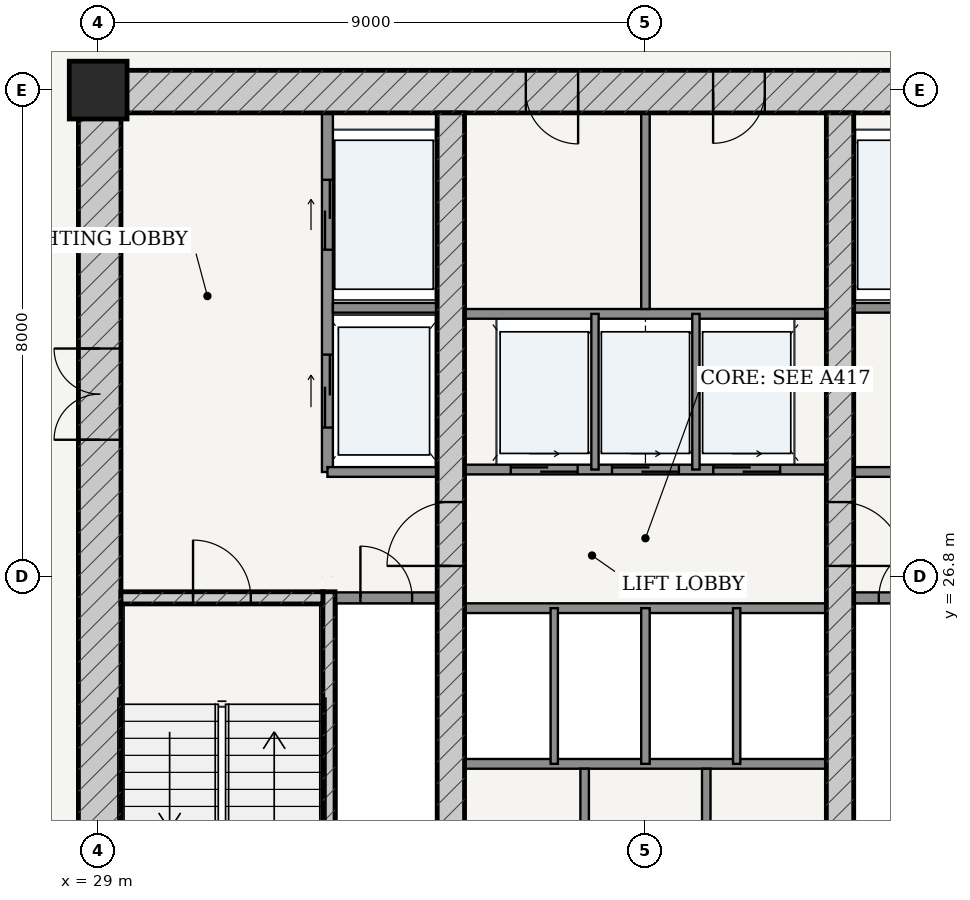
"""IFC4 building model, lengths in metres.
Left out: names, types, materials, properties, quantities, classifications, styles, units other than length and angle.
Written with IfcOpenShell. Run it as: python <this file> out.ifc"""

import sys

from ifc_helpers import new_model, si_unit, direction, frame, frame_2d, origin, origin_2d, place, context, subcontext, project, spatial, rectangle, extrude, source, transform, mapped, element, fill, save


model = new_model("IFC4")
c1 = context("Model", 3, precision=1e-05, world=origin(), true_north=direction((-0.2419218956, 0.970295726276)))
c2 = subcontext(c1, "Body", "Model", "MODEL_VIEW")
j1 = project(units=[si_unit("LENGTHUNIT", "METRE"), si_unit("PLANEANGLEUNIT", "RADIAN")], contexts=[c1])
p1 = place(None, origin())
s1 = spatial("IfcSite", under=j1, at=p1, CompositionType="ELEMENT")
p2 = place(p1, origin())
s2 = spatial("IfcBuilding", under=s1, at=p2, CompositionType="ELEMENT")
p3 = place(p2, frame((0.0, 0.0, 101.4)))
s3 = spatial("IfcBuildingStorey", under=s2, at=p3, CompositionType="ELEMENT", Elevation=101.4)
p4 = place(p3, frame((29.0, 34.8, 0.0), z_axis=(0.0, 0.0, 1.0), x_axis=(1.0, 0.0, 0.0)))
e1 = element("IfcColumn", 1, at=p4, inside=s3, PredefinedType="COLUMN", context=c2, shape_type="SweptSolid", body=[
    extrude(rectangle(XDim=0.95, YDim=0.95, at=origin_2d()), origin(), (0.0, 0.0, 1.0), 3.6),
])
p5 = place(p3, frame((28.675, 34.775, 0.0), z_axis=(0.0, 0.0, 1.0), x_axis=(1.0, 0.0, 0.0)))
e2 = element("IfcWall", 2, at=p5, inside=s3, PredefinedType="SHEAR", context=c2, shape_type="SweptSolid", body=[
    extrude(rectangle(XDim=18.65, YDim=0.7, at=frame_2d((9.325, 0.0))), origin(), (0.0, 0.0, 1.0), 3.325),
])
p6 = place(p5, frame((7.357, 0.0, 0.0)))
e3 = element("IfcOpeningElement", 3, at=p6, cuts=e2, PredefinedType="OPENING", context=c2, shape_type="SweptSolid", body=[
    extrude(rectangle(XDim=0.86, YDim=2.1, at=frame_2d((0.43, 1.05))), frame((0.0, 0.36, 0.0), z_axis=(0.0, -1.0, 0.0), x_axis=(1.0, 0.0, 0.0)), (0.0, 0.0, 1.0), 0.72),
])
p7 = place(p5, frame((10.438, 0.0, 0.0)))
e4 = element("IfcOpeningElement", 4, at=p7, cuts=e2, PredefinedType="OPENING", context=c2, shape_type="SweptSolid", body=[
    extrude(rectangle(XDim=0.85, YDim=2.1, at=frame_2d((0.425, 1.05))), frame((0.0, 0.36, 0.0), z_axis=(0.0, -1.0, 0.0), x_axis=(1.0, 0.0, 0.0)), (0.0, 0.0, 1.0), 0.72),
])
p8 = place(p3, frame((29.025, 19.175, 0.0), z_axis=(0.0, 0.0, 1.0), x_axis=(0.0, 1.0, 0.0)))
e5 = element("IfcWall", 5, at=p8, inside=s3, PredefinedType="SHEAR", context=c2, shape_type="SweptSolid", body=[
    extrude(rectangle(XDim=15.25, YDim=0.7, at=frame_2d((7.625, 0.0))), origin(), (0.0, 0.0, 1.0), 3.325),
])
p9 = place(p8, frame((9.875, 0.0, 0.0)))
e6 = element("IfcOpeningElement", 6, at=p9, cuts=e5, PredefinedType="OPENING", context=c2, shape_type="SweptSolid", body=[
    extrude(rectangle(XDim=1.5, YDim=2.2, at=frame_2d((0.75, 1.1))), frame((0.0, 0.36, 0.0), z_axis=(0.0, -1.0, 0.0), x_axis=(1.0, 0.0, 0.0)), (0.0, 0.0, 1.0), 0.72),
])
p10 = place(p3, frame((32.795, 19.175, 0.0), z_axis=(0.0, 0.0, 1.0), x_axis=(0.0, 1.0, 0.0)))
e7 = element("IfcWall", 7, at=p10, inside=s3, PredefinedType="SOLIDWALL", context=c2, shape_type="SweptSolid", body=[
    extrude(rectangle(XDim=7.375, YDim=0.2, at=frame_2d((3.688, 0.0))), origin(), (0.0, 0.0, 1.0), 3.325),
])
p11 = place(p3, frame((29.375, 26.45, 0.0), z_axis=(0.0, 0.0, 1.0), x_axis=(1.0, 0.0, 0.0)))
e8 = element("IfcWall", 8, at=p11, inside=s3, PredefinedType="SOLIDWALL", context=c2, shape_type="SweptSolid", body=[
    extrude(rectangle(XDim=3.32, YDim=0.2, at=frame_2d((1.66, 0.0))), origin(), (0.0, 0.0, 1.0), 3.325),
])
p12 = place(p11, frame((1.185, 0.0, 0.0)))
e9 = element("IfcOpeningElement", 9, at=p12, cuts=e8, PredefinedType="OPENING", context=c2, shape_type="SweptSolid", body=[
    extrude(rectangle(XDim=0.95, YDim=2.15, at=frame_2d((0.475, 1.075))), frame((0.0, 0.11, 0.0), z_axis=(0.0, -1.0, 0.0), x_axis=(1.0, 0.0, 0.0)), (0.0, 0.0, 1.0), 0.22),
])
p13 = place(p3, frame((34.8, 19.175, 0.0), z_axis=(0.0, 0.0, 1.0), x_axis=(0.0, 1.0, 0.0)))
e10 = element("IfcWall", 10, at=p13, inside=s3, PredefinedType="SHEAR", context=c2, shape_type="SweptSolid", body=[
    extrude(rectangle(XDim=15.25, YDim=0.45, at=frame_2d((7.625, 0.0))), origin(), (0.0, 0.0, 1.0), 3.325),
])
p14 = place(p13, frame((7.8, 0.0, 0.0)))
e11 = element("IfcOpeningElement", 11, at=p14, cuts=e10, PredefinedType="OPENING", context=c2, shape_type="SweptSolid", body=[
    extrude(rectangle(XDim=1.05, YDim=2.15, at=frame_2d((0.525, 1.075))), frame((0.0, 0.235, 0.0), z_axis=(0.0, -1.0, 0.0), x_axis=(1.0, 0.0, 0.0)), (0.0, 0.0, 1.0), 0.47),
])
p15 = place(p3, frame((41.2, 19.175, 0.0), z_axis=(0.0, 0.0, 1.0), x_axis=(0.0, 1.0, 0.0)))
e12 = element("IfcWall", 12, at=p15, inside=s3, PredefinedType="SHEAR", context=c2, shape_type="SweptSolid", body=[
    extrude(rectangle(XDim=15.25, YDim=0.45, at=frame_2d((7.625, 0.0))), origin(), (0.0, 0.0, 1.0), 3.325),
])
p16 = place(p15, frame((7.8, 0.0, 0.0)))
e13 = element("IfcOpeningElement", 13, at=p16, cuts=e12, PredefinedType="OPENING", context=c2, shape_type="SweptSolid", body=[
    extrude(rectangle(XDim=1.05, YDim=2.15, at=frame_2d((0.525, 1.075))), frame((0.0, 0.235, 0.0), z_axis=(0.0, -1.0, 0.0), x_axis=(1.0, 0.0, 0.0)), (0.0, 0.0, 1.0), 0.47),
])
p17 = place(p3, frame((32.9, 26.45, 0.0), z_axis=(0.0, 0.0, 1.0), x_axis=(1.0, 0.0, 0.0)))
e14 = element("IfcWall", 14, at=p17, inside=s3, PredefinedType="PARTITIONING", context=c2, shape_type="SweptSolid", body=[
    extrude(rectangle(XDim=1.675, YDim=0.18, at=frame_2d((0.837, 0.0))), origin(), (0.0, 0.0, 1.0), 3.325),
])
p18 = place(p17, frame((0.413, 0.0, 0.0)))
e15 = element("IfcOpeningElement", 15, at=p18, cuts=e14, PredefinedType="OPENING", context=c2, shape_type="SweptSolid", body=[
    extrude(rectangle(XDim=0.85, YDim=2.1, at=frame_2d((0.425, 1.05))), frame((0.0, 0.1, 0.0), z_axis=(0.0, -1.0, 0.0), x_axis=(1.0, 0.0, 0.0)), (0.0, 0.0, 1.0), 0.2),
])
p19 = place(p3, frame((41.425, 26.45, 0.0), z_axis=(0.0, 0.0, 1.0), x_axis=(1.0, 0.0, 0.0)))
e16 = element("IfcWall", 16, at=p19, inside=s3, PredefinedType="PARTITIONING", context=c2, shape_type="SweptSolid", body=[
    extrude(rectangle(XDim=1.675, YDim=0.18, at=frame_2d((0.837, 0.0))), origin(), (0.0, 0.0, 1.0), 3.325),
])
p20 = place(p19, frame((0.413, 0.0, 0.0)))
e17 = element("IfcOpeningElement", 17, at=p20, cuts=e16, PredefinedType="OPENING", context=c2, shape_type="SweptSolid", body=[
    extrude(rectangle(XDim=0.85, YDim=2.1, at=frame_2d((0.425, 1.05))), frame((0.0, 0.1, 0.0), z_axis=(0.0, -1.0, 0.0), x_axis=(1.0, 0.0, 0.0)), (0.0, 0.0, 1.0), 0.2),
])
p21 = place(p3, frame((32.77, 28.52, 0.0), z_axis=(0.0, 0.0, 1.0), x_axis=(0.0, 1.0, 0.0)))
e18 = element("IfcWall", 18, at=p21, inside=s3, PredefinedType="PARTITIONING", context=c2, shape_type="SweptSolid", body=[
    extrude(rectangle(XDim=5.905, YDim=0.18, at=frame_2d((2.953, 0.0))), origin(), (0.0, 0.0, 1.0), 3.325),
])
p22 = place(p21, frame((3.655, 0.0, 0.0)))
e19 = element("IfcOpeningElement", 19, at=p22, cuts=e18, PredefinedType="OPENING", context=c2, shape_type="SweptSolid", body=[
    extrude(rectangle(XDim=1.15, YDim=2.2, at=frame_2d((0.575, 1.1))), frame((0.0, 0.1, 0.0), z_axis=(0.0, -1.0, 0.0), x_axis=(1.0, 0.0, 0.0)), (0.0, 0.0, 1.0), 0.2),
])
p23 = place(p21, frame((0.73, 0.0, 0.0)))
e20 = element("IfcOpeningElement", 20, at=p23, cuts=e18, PredefinedType="OPENING", context=c2, shape_type="SweptSolid", body=[
    extrude(rectangle(XDim=1.2, YDim=2.25, at=frame_2d((0.6, 1.125))), frame((0.0, 0.1, 0.0), z_axis=(0.0, -1.0, 0.0), x_axis=(1.0, 0.0, 0.0)), (0.0, 0.0, 1.0), 0.2),
])
p24 = place(p3, frame((32.86, 31.22, 0.0), z_axis=(0.0, 0.0, 1.0), x_axis=(1.0, 0.0, 0.0)))
e21 = element("IfcWall", 21, at=p24, inside=s3, PredefinedType="PARTITIONING", context=c2, shape_type="SweptSolid", body=[
    extrude(rectangle(XDim=1.715, YDim=0.16, at=frame_2d((0.857, 0.0))), origin(), (0.0, 0.0, 1.0), 3.325),
])
p25 = place(p3, frame((32.77, 28.52, 0.0), z_axis=(0.0, 0.0, 1.0), x_axis=(1.0, 0.0, 0.0)))
e22 = element("IfcWall", 22, at=p25, inside=s3, PredefinedType="PARTITIONING", context=c2, shape_type="SweptSolid", body=[
    extrude(rectangle(XDim=1.805, YDim=0.16, at=frame_2d((0.902, 0.0))), origin(), (0.0, 0.0, 1.0), 3.325),
])
p26 = place(p3, frame((41.425, 31.22, 0.0), z_axis=(0.0, 0.0, 1.0), x_axis=(1.0, 0.0, 0.0)))
e23 = element("IfcWall", 23, at=p26, inside=s3, PredefinedType="PARTITIONING", context=c2, shape_type="SweptSolid", body=[
    extrude(rectangle(XDim=1.715, YDim=0.16, at=frame_2d((0.857, 0.0))), origin(), (0.0, 0.0, 1.0), 3.325),
])
p27 = place(p3, frame((41.425, 28.52, 0.0), z_axis=(0.0, 0.0, 1.0), x_axis=(1.0, 0.0, 0.0)))
e24 = element("IfcWall", 24, at=p27, inside=s3, PredefinedType="PARTITIONING", context=c2, shape_type="SweptSolid", body=[
    extrude(rectangle(XDim=1.805, YDim=0.16, at=frame_2d((0.902, 0.0))), origin(), (0.0, 0.0, 1.0), 3.325),
])
p28 = place(p3, frame((35.025, 28.56, 0.0), z_axis=(0.0, 0.0, 1.0), x_axis=(1.0, 0.0, 0.0)))
e25 = element("IfcWall", 25, at=p28, inside=s3, PredefinedType="PARTITIONING", context=c2, shape_type="SweptSolid", body=[
    extrude(rectangle(XDim=5.95, YDim=0.16, at=frame_2d((2.975, 0.0))), origin(), (0.0, 0.0, 1.0), 3.325),
])
p29 = place(p28, frame((0.76, 0.0, 0.0)))
e26 = element("IfcOpeningElement", 26, at=p29, cuts=e25, PredefinedType="OPENING", context=c2, shape_type="SweptSolid", body=[
    extrude(rectangle(XDim=1.1, YDim=2.2, at=frame_2d((0.55, 1.1))), frame((0.0, 0.09, 0.0), z_axis=(0.0, -1.0, 0.0), x_axis=(1.0, 0.0, 0.0)), (0.0, 0.0, 1.0), 0.18),
])
p30 = place(p28, frame((2.425, 0.0, 0.0)))
e27 = element("IfcOpeningElement", 27, at=p30, cuts=e25, PredefinedType="OPENING", context=c2, shape_type="SweptSolid", body=[
    extrude(rectangle(XDim=1.1, YDim=2.2, at=frame_2d((0.55, 1.1))), frame((0.0, 0.09, 0.0), z_axis=(0.0, -1.0, 0.0), x_axis=(1.0, 0.0, 0.0)), (0.0, 0.0, 1.0), 0.18),
])
p31 = place(p28, frame((4.09, 0.0, 0.0)))
e28 = element("IfcOpeningElement", 28, at=p31, cuts=e25, PredefinedType="OPENING", context=c2, shape_type="SweptSolid", body=[
    extrude(rectangle(XDim=1.1, YDim=2.2, at=frame_2d((0.55, 1.1))), frame((0.0, 0.09, 0.0), z_axis=(0.0, -1.0, 0.0), x_axis=(1.0, 0.0, 0.0)), (0.0, 0.0, 1.0), 0.18),
])
p32 = place(p3, frame((35.025, 31.12, 0.0), z_axis=(0.0, 0.0, 1.0), x_axis=(1.0, 0.0, 0.0)))
e29 = element("IfcWall", 29, at=p32, inside=s3, PredefinedType="PARTITIONING", context=c2, shape_type="SweptSolid", body=[
    extrude(rectangle(XDim=5.95, YDim=0.16, at=frame_2d((2.975, 0.0))), origin(), (0.0, 0.0, 1.0), 3.325),
])
for number, where, z_axis, x_axis in (
    (30, (37.17, 28.56, 0.0), (0.0, 0.0, 1.0), (0.0, 1.0, 0.0)),
    (31, (38.83, 28.56, 0.0), (0.0, 0.0, 1.0), (0.0, 1.0, 0.0)),
):
    element("IfcWall", number, at=place(p3, frame(where, z_axis=z_axis, x_axis=x_axis)), inside=s3, PredefinedType="PARTITIONING", context=c2, shape_type="SweptSolid", body=[
        extrude(rectangle(XDim=2.56, YDim=0.12, at=frame_2d((1.28, 0.0))), origin(), (0.0, 0.0, 1.0), 3.325),
    ])
p33 = place(p3, frame((38.0, 31.2, 0.0), z_axis=(0.0, 0.0, 1.0), x_axis=(0.0, 1.0, 0.0)))
e32 = element("IfcWall", 32, at=p33, inside=s3, PredefinedType="PARTITIONING", context=c2, shape_type="SweptSolid", body=[
    extrude(rectangle(XDim=3.225, YDim=0.14, at=frame_2d((1.613, 0.0))), origin(), (0.0, 0.0, 1.0), 3.325),
])
for number, where, z_axis, x_axis in (
    (33, (35.025, 26.28, 0.0), (0.0, 0.0, 1.0), (1.0, 0.0, 0.0)),
    (34, (35.025, 23.72, 0.0), (0.0, 0.0, 1.0), (1.0, 0.0, 0.0)),
):
    element("IfcWall", number, at=place(p3, frame(where, z_axis=z_axis, x_axis=x_axis)), inside=s3, PredefinedType="PARTITIONING", context=c2, shape_type="SweptSolid", body=[
        extrude(rectangle(XDim=5.95, YDim=0.16, at=frame_2d((2.975, 0.0))), origin(), (0.0, 0.0, 1.0), 3.325),
    ])
p34 = place(p3, frame((36.5, 23.72, 0.0), z_axis=(0.0, 0.0, 1.0), x_axis=(0.0, 1.0, 0.0)))
e35 = element("IfcWall", 35, at=p34, inside=s3, PredefinedType="PARTITIONING", context=c2, shape_type="SweptSolid", body=[
    extrude(rectangle(XDim=2.56, YDim=0.12, at=frame_2d((1.28, 0.0))), origin(), (0.0, 0.0, 1.0), 3.325),
])
p35 = place(p3, frame((38.0, 23.72, 0.0), z_axis=(0.0, 0.0, 1.0), x_axis=(0.0, 1.0, 0.0)))
e36 = element("IfcWall", 36, at=p35, inside=s3, PredefinedType="PARTITIONING", context=c2, shape_type="SweptSolid", body=[
    extrude(rectangle(XDim=2.56, YDim=0.14, at=frame_2d((1.28, 0.0))), origin(), (0.0, 0.0, 1.0), 3.325),
])
p36 = place(p3, frame((39.5, 23.72, 0.0), z_axis=(0.0, 0.0, 1.0), x_axis=(0.0, 1.0, 0.0)))
e37 = element("IfcWall", 37, at=p36, inside=s3, PredefinedType="PARTITIONING", context=c2, shape_type="SweptSolid", body=[
    extrude(rectangle(XDim=2.56, YDim=0.12, at=frame_2d((1.28, 0.0))), origin(), (0.0, 0.0, 1.0), 3.325),
])
p37 = place(p3, frame((37.0, 19.175, 0.0), z_axis=(0.0, 0.0, 1.0), x_axis=(0.0, 1.0, 0.0)))
e38 = element("IfcWall", 38, at=p37, inside=s3, PredefinedType="PARTITIONING", context=c2, shape_type="SweptSolid", body=[
    extrude(rectangle(XDim=4.465, YDim=0.14, at=frame_2d((2.232, 0.0))), origin(), (0.0, 0.0, 1.0), 3.325),
])
p38 = place(p37, frame((1.808, 0.0, 0.0)))
e39 = element("IfcOpeningElement", 39, at=p38, cuts=e38, PredefinedType="OPENING", context=c2, shape_type="SweptSolid", body=[
    extrude(rectangle(XDim=0.85, YDim=2.1, at=frame_2d((0.425, 1.05))), frame((0.0, 0.08, 0.0), z_axis=(0.0, -1.0, 0.0), x_axis=(1.0, 0.0, 0.0)), (0.0, 0.0, 1.0), 0.16),
])
p39 = place(p3, frame((39.0, 19.175, 0.0), z_axis=(0.0, 0.0, 1.0), x_axis=(0.0, 1.0, 0.0)))
e40 = element("IfcWall", 40, at=p39, inside=s3, PredefinedType="PARTITIONING", context=c2, shape_type="SweptSolid", body=[
    extrude(rectangle(XDim=4.465, YDim=0.14, at=frame_2d((2.232, 0.0))), origin(), (0.0, 0.0, 1.0), 3.325),
])
p40 = place(p39, frame((1.808, 0.0, 0.0)))
e41 = element("IfcOpeningElement", 41, at=p40, cuts=e40, PredefinedType="OPENING", context=c2, shape_type="SweptSolid", body=[
    extrude(rectangle(XDim=0.85, YDim=2.1, at=frame_2d((0.425, 1.05))), frame((0.0, 0.08, 0.0), z_axis=(0.0, -1.0, 0.0), x_axis=(1.0, 0.0, 0.0)), (0.0, 0.0, 1.0), 0.16),
])
m1 = source(origin(), c2, "Body", "SweptSolid", [
    extrude(rectangle(XDim=1.5, YDim=2.2, at=frame_2d((0.75, 1.1))), frame((0.0, 0.025, 0.0), z_axis=(0.0, -1.0, 0.0), x_axis=(1.0, 0.0, 0.0)), (0.0, 0.0, 1.0), 0.05),
])
p41 = place(p9, origin())
e42 = element("IfcDoor", 42, at=p41, inside=s3, OperationType="DOUBLE_DOOR_SINGLE_SWING", PredefinedType="DOOR", context=c2, shape_type="MappedRepresentation", body=[
    mapped(m1, transform((0.0, 0.0, 0.0), scale=1.0)),
])
fill(e6, e42)
m2 = source(origin(), c2, "Body", "SweptSolid", [
    extrude(rectangle(XDim=1.05, YDim=2.15, at=frame_2d((0.525, 1.075))), frame((0.0, 0.025, 0.0), z_axis=(0.0, -1.0, 0.0), x_axis=(1.0, 0.0, 0.0)), (0.0, 0.0, 1.0), 0.05),
])
p42 = place(p14, origin())
e43 = element("IfcDoor", 43, at=p42, inside=s3, OperationType="SINGLE_SWING_LEFT", PredefinedType="DOOR", context=c2, shape_type="MappedRepresentation", body=[
    mapped(m2, transform((0.0, 0.0, 0.0), scale=1.0)),
])
fill(e11, e43)
p43 = place(p16, frame((1.05, 0.0, 0.0), z_axis=(0.0, 0.0, 1.0), x_axis=(-1.0, 0.0, 0.0)))
e44 = element("IfcDoor", 44, at=p43, inside=s3, OperationType="SINGLE_SWING_RIGHT", PredefinedType="DOOR", context=c2, shape_type="MappedRepresentation", body=[
    mapped(m2, transform((0.0, 0.0, 0.0), scale=1.0)),
])
fill(e13, e44)
m3 = source(origin(), c2, "Body", "SweptSolid", [
    extrude(rectangle(XDim=0.95, YDim=2.15, at=frame_2d((0.475, 1.075))), frame((0.0, 0.025, 0.0), z_axis=(0.0, -1.0, 0.0), x_axis=(1.0, 0.0, 0.0)), (0.0, 0.0, 1.0), 0.05),
])
p44 = place(p12, origin())
e45 = element("IfcDoor", 45, at=p44, inside=s3, OperationType="SINGLE_SWING_LEFT", PredefinedType="DOOR", context=c2, shape_type="MappedRepresentation", body=[
    mapped(m3, transform((0.0, 0.0, 0.0), scale=1.0)),
])
fill(e9, e45)
m4 = source(origin(), c2, "Body", "SweptSolid", [
    extrude(rectangle(XDim=0.85, YDim=2.1, at=frame_2d((0.425, 1.05))), frame((0.0, 0.025, 0.0), z_axis=(0.0, -1.0, 0.0), x_axis=(1.0, 0.0, 0.0)), (0.0, 0.0, 1.0), 0.05),
])
p45 = place(p18, origin())
e46 = element("IfcDoor", 46, at=p45, inside=s3, OperationType="SINGLE_SWING_LEFT", PredefinedType="DOOR", context=c2, shape_type="MappedRepresentation", body=[
    mapped(m4, transform((0.0, 0.0, 0.0), scale=1.0)),
])
fill(e15, e46)
p46 = place(p20, origin())
e47 = element("IfcDoor", 47, at=p46, inside=s3, OperationType="SINGLE_SWING_RIGHT", PredefinedType="DOOR", context=c2, shape_type="MappedRepresentation", body=[
    mapped(m4, transform((0.0, 0.0, 0.0), scale=1.0)),
])
fill(e17, e47)
m5 = source(origin(), c2, "Body", "SweptSolid", [
    extrude(rectangle(XDim=0.86, YDim=2.1, at=frame_2d((0.43, 1.05))), frame((0.0, 0.025, 0.0), z_axis=(0.0, -1.0, 0.0), x_axis=(1.0, 0.0, 0.0)), (0.0, 0.0, 1.0), 0.05),
])
p47 = place(p6, frame((0.86, 0.0, 0.0), z_axis=(0.0, 0.0, 1.0), x_axis=(-1.0, 0.0, 0.0)))
e48 = element("IfcDoor", 48, at=p47, inside=s3, OperationType="SINGLE_SWING_LEFT", PredefinedType="DOOR", context=c2, shape_type="MappedRepresentation", body=[
    mapped(m5, transform((0.0, 0.0, 0.0), scale=1.0)),
])
fill(e3, e48)
p48 = place(p7, frame((0.85, 0.0, 0.0), z_axis=(0.0, 0.0, 1.0), x_axis=(-1.0, 0.0, 0.0)))
e49 = element("IfcDoor", 49, at=p48, inside=s3, OperationType="SINGLE_SWING_RIGHT", PredefinedType="DOOR", context=c2, shape_type="MappedRepresentation", body=[
    mapped(m4, transform((0.0, 0.0, 0.0), scale=1.0)),
])
fill(e4, e49)
m6 = source(origin(), c2, "Body", "SweptSolid", [
    extrude(rectangle(XDim=1.15, YDim=2.2, at=frame_2d((0.575, 1.1))), frame((0.0, 0.025, 0.0), z_axis=(0.0, -1.0, 0.0), x_axis=(1.0, 0.0, 0.0)), (0.0, 0.0, 1.0), 0.05),
])
p49 = place(p22, origin())
e50 = element("IfcDoor", 50, at=p49, inside=s3, OperationType="DOUBLE_DOOR_SLIDING", PredefinedType="DOOR", context=c2, shape_type="MappedRepresentation", body=[
    mapped(m6, transform((0.0, 0.0, 0.0), scale=1.0)),
])
fill(e19, e50)
m7 = source(origin(), c2, "Body", "SweptSolid", [
    extrude(rectangle(XDim=1.2, YDim=2.25, at=frame_2d((0.6, 1.125))), frame((0.0, 0.025, 0.0), z_axis=(0.0, -1.0, 0.0), x_axis=(1.0, 0.0, 0.0)), (0.0, 0.0, 1.0), 0.05),
])
p50 = place(p23, origin())
e51 = element("IfcDoor", 51, at=p50, inside=s3, OperationType="DOUBLE_DOOR_SLIDING", PredefinedType="DOOR", context=c2, shape_type="MappedRepresentation", body=[
    mapped(m7, transform((0.0, 0.0, 0.0), scale=1.0)),
])
fill(e20, e51)
m8 = source(origin(), c2, "Body", "SweptSolid", [
    extrude(rectangle(XDim=1.1, YDim=2.2, at=frame_2d((0.55, 1.1))), frame((0.0, 0.025, 0.0), z_axis=(0.0, -1.0, 0.0), x_axis=(1.0, 0.0, 0.0)), (0.0, 0.0, 1.0), 0.05),
])
p51 = place(p29, origin())
e52 = element("IfcDoor", 52, at=p51, inside=s3, OperationType="DOUBLE_DOOR_SLIDING", PredefinedType="DOOR", context=c2, shape_type="MappedRepresentation", body=[
    mapped(m8, transform((0.0, 0.0, 0.0), scale=1.0)),
])
fill(e26, e52)
p52 = place(p30, origin())
e53 = element("IfcDoor", 53, at=p52, inside=s3, OperationType="DOUBLE_DOOR_SLIDING", PredefinedType="DOOR", context=c2, shape_type="MappedRepresentation", body=[
    mapped(m8, transform((0.0, 0.0, 0.0), scale=1.0)),
])
fill(e27, e53)
p53 = place(p31, origin())
e54 = element("IfcDoor", 54, at=p53, inside=s3, OperationType="DOUBLE_DOOR_SLIDING", PredefinedType="DOOR", context=c2, shape_type="MappedRepresentation", body=[
    mapped(m8, transform((0.0, 0.0, 0.0), scale=1.0)),
])
fill(e28, e54)
save(model, sys.argv[1])
